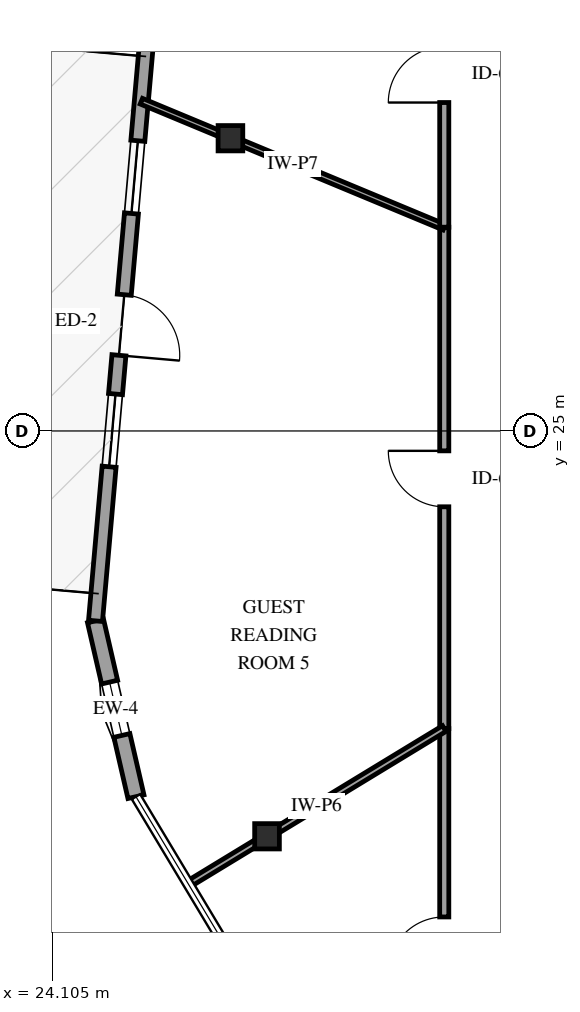
"""IFC4 building model, lengths in metres.
Left out: names, types, materials, properties, quantities, classifications, styles, units other than length and angle.
Written with IfcOpenShell. Run it as: python <this file> out.ifc"""

import sys

from ifc_helpers import new_model, si_unit, direction, frame, frame_2d, origin, origin_2d, place, context, subcontext, project, spatial, rectangle, i_section, extrude, element, fill, save


model = new_model("IFC4")
c1 = context("Model", 3, precision=1e-05, world=origin(), true_north=direction((0.0, 1.0)))
c2 = subcontext(c1, "Body", "Model", "MODEL_VIEW")
j1 = project(units=[si_unit("LENGTHUNIT", "METRE"), si_unit("PLANEANGLEUNIT", "RADIAN")], contexts=[c1])
p1 = place(None, origin())
s1 = spatial("IfcSite", under=j1, at=p1, CompositionType="ELEMENT")
p2 = place(p1, origin())
s2 = spatial("IfcBuilding", under=s1, at=p2, CompositionType="ELEMENT")
p3 = place(p2, frame((0.0, 0.0, 212.2)))
s3 = spatial("IfcBuildingStorey", under=s2, at=p3, CompositionType="ELEMENT", Elevation=212.2)
for number, where, z_axis, x_axis in (
    (1, (27.034, 29.814, 0.0), (0.0, 0.0, 1.0), (1.0, 0.0, 0.0)),
    (2, (27.635, 18.334, 0.0), (0.0, 0.0, 1.0), (1.0, 0.0, 0.0)),
):
    element("IfcColumn", number, at=place(p3, frame(where, z_axis=z_axis, x_axis=x_axis)), inside=s3, PredefinedType="COLUMN", context=c2, shape_type="SweptSolid", body=[
        extrude(i_section(OverallWidth=0.406, OverallDepth=0.416, WebThickness=0.03, FlangeThickness=0.048, FilletRadius=0.038, at=origin_2d()), origin(), (0.0, 0.0, 1.0), 3.6),
    ])
p4 = place(p3, frame((24.815, 21.877, 0.0), z_axis=(0.0, 0.0, 1.0), x_axis=(0.224270411894, -0.974526953116, 0.0)))
e3 = element("IfcWall", 3, at=p4, inside=s3, PredefinedType="SOLIDWALL", context=c2, shape_type="SweptSolid", body=[
    extrude(rectangle(XDim=2.967, YDim=0.27, at=frame_2d((1.483, 0.0))), origin(), (0.0, 0.0, 1.0), 2.679),
])
p5 = place(p4, frame((1.033, 0.0, 0.75)))
e4 = element("IfcOpeningElement", 4, at=p5, cuts=e3, PredefinedType="OPENING", context=c2, shape_type="SweptSolid", body=[
    extrude(rectangle(XDim=0.9, YDim=1.5, at=frame_2d((0.45, 0.75))), frame((0.0, 0.145, 0.0), z_axis=(0.0, -1.0, 0.0), x_axis=(1.0, 0.0, 0.0)), (0.0, 0.0, 1.0), 0.29),
])
p6 = place(p3, frame((25.673, 31.608, 0.0), z_axis=(0.0, 0.0, 1.0), x_axis=(-0.087869741306, -0.996131973467, 0.0)))
e5 = element("IfcWall", 5, at=p6, inside=s3, PredefinedType="SOLIDWALL", context=c2, shape_type="SweptSolid", body=[
    extrude(rectangle(XDim=9.769, YDim=0.23, at=frame_2d((4.885, 0.0))), origin(), (0.0, 0.0, 1.0), 2.679),
])
p7 = place(p6, frame((4.385, 0.0, 0.0)))
e6 = element("IfcOpeningElement", 6, at=p7, cuts=e5, PredefinedType="OPENING", context=c2, shape_type="SweptSolid", body=[
    extrude(rectangle(XDim=1.0, YDim=2.15, at=frame_2d((0.5, 1.075))), frame((0.0, 0.125, 0.0), z_axis=(0.0, -1.0, 0.0), x_axis=(1.0, 0.0, 0.0)), (0.0, 0.0, 1.0), 0.25),
])
p8 = place(p6, frame((1.843, 0.0, 0.72)))
e7 = element("IfcOpeningElement", 7, at=p8, cuts=e5, PredefinedType="OPENING", context=c2, shape_type="SweptSolid", body=[
    extrude(rectangle(XDim=1.2, YDim=1.6, at=frame_2d((0.6, 0.8))), frame((0.0, 0.125, 0.0), z_axis=(0.0, -1.0, 0.0), x_axis=(1.0, 0.0, 0.0)), (0.0, 0.0, 1.0), 0.25),
])
p9 = place(p6, frame((6.024, 0.0, 0.72)))
e8 = element("IfcOpeningElement", 8, at=p9, cuts=e5, PredefinedType="OPENING", context=c2, shape_type="SweptSolid", body=[
    extrude(rectangle(XDim=1.2, YDim=1.6, at=frame_2d((0.6, 0.8))), frame((0.0, 0.125, 0.0), z_axis=(0.0, -1.0, 0.0), x_axis=(1.0, 0.0, 0.0)), (0.0, 0.0, 1.0), 0.25),
])
p10 = place(p3, frame((30.55, 20.106, 0.0), z_axis=(0.0, 0.0, 1.0), x_axis=(0.0, 1.0, 0.0)))
e9 = element("IfcWall", 9, at=p10, inside=s3, PredefinedType="PARTITIONING", context=c2, shape_type="SweptSolid", body=[
    extrude(rectangle(XDim=8.245, YDim=0.15, at=frame_2d((4.123, 0.0))), origin(), (0.0, 0.0, 1.0), 3.3),
])
p11 = place(p10, frame((3.647, 0.0, 0.0)))
e10 = element("IfcOpeningElement", 10, at=p11, cuts=e9, PredefinedType="OPENING", context=c2, shape_type="SweptSolid", body=[
    extrude(rectangle(XDim=0.92, YDim=2.12, at=frame_2d((0.46, 1.06))), frame((0.0, 0.085, 0.0), z_axis=(0.0, -1.0, 0.0), x_axis=(1.0, 0.0, 0.0)), (0.0, 0.0, 1.0), 0.17),
])
p12 = place(p3, frame((30.55, 13.02, 0.0), z_axis=(0.0, 0.0, 1.0), x_axis=(0.0, 1.0, 0.0)))
e11 = element("IfcWall", 11, at=p12, inside=s3, PredefinedType="PARTITIONING", context=c2, shape_type="SweptSolid", body=[
    extrude(rectangle(XDim=7.086, YDim=0.15, at=frame_2d((3.543, 0.0))), origin(), (0.0, 0.0, 1.0), 3.3),
])
p13 = place(p12, frame((3.068, 0.0, 0.0)))
e12 = element("IfcOpeningElement", 12, at=p13, cuts=e11, PredefinedType="OPENING", context=c2, shape_type="SweptSolid", body=[
    extrude(rectangle(XDim=0.92, YDim=2.12, at=frame_2d((0.46, 1.06))), frame((0.0, 0.085, 0.0), z_axis=(0.0, -1.0, 0.0), x_axis=(1.0, 0.0, 0.0)), (0.0, 0.0, 1.0), 0.17),
])
p14 = place(p3, frame((30.55, 28.351, 0.0), z_axis=(0.0, 0.0, 1.0), x_axis=(-0.923299028804, 0.384081896748, 0.0)))
e13 = element("IfcWall", 13, at=p14, inside=s3, PredefinedType="PARTITIONING", context=c2, shape_type="SweptSolid", body=[
    extrude(rectangle(XDim=5.395, YDim=0.1, at=frame_2d((2.697, 0.0))), origin(), (0.0, 0.0, 1.0), 3.3),
])
p15 = place(p3, frame((30.55, 28.351, 0.0), z_axis=(0.0, 0.0, 1.0), x_axis=(0.0, 1.0, 0.0)))
e14 = element("IfcWall", 14, at=p15, inside=s3, PredefinedType="PARTITIONING", context=c2, shape_type="SweptSolid", body=[
    extrude(rectangle(XDim=5.05, YDim=0.15, at=frame_2d((2.525, 0.0))), origin(), (0.0, 0.0, 1.0), 3.3),
])
p16 = place(p15, frame((2.05, 0.0, 0.0)))
e15 = element("IfcOpeningElement", 15, at=p16, cuts=e14, PredefinedType="OPENING", context=c2, shape_type="SweptSolid", body=[
    extrude(rectangle(XDim=0.92, YDim=2.12, at=frame_2d((0.46, 1.06))), frame((0.0, 0.085, 0.0), z_axis=(0.0, -1.0, 0.0), x_axis=(1.0, 0.0, 0.0)), (0.0, 0.0, 1.0), 0.17),
])
p17 = place(p3, frame((30.55, 20.106, 0.0), z_axis=(0.0, 0.0, 1.0), x_axis=(-0.854463677574, -0.519511139156, 0.0)))
e16 = element("IfcWall", 16, at=p17, inside=s3, PredefinedType="PARTITIONING", context=c2, shape_type="SweptSolid", body=[
    extrude(rectangle(XDim=4.924, YDim=0.11, at=frame_2d((2.462, 0.0))), origin(), (0.0, 0.0, 1.0), 3.3),
])
p18 = place(p5, origin())
e17 = element("IfcWindow", 17, at=p18, inside=s3, PartitioningType="SINGLE_PANEL", PredefinedType="WINDOW", context=c2, shape_type="SweptSolid", body=[
    extrude(rectangle(XDim=0.9, YDim=1.5, at=frame_2d((0.45, 0.75))), frame((0.0, 0.03, 0.0), z_axis=(0.0, -1.0, 0.0), x_axis=(1.0, 0.0, 0.0)), (0.0, 0.0, 1.0), 0.06),
])
fill(e4, e17)
p19 = place(p7, origin())
e18 = element("IfcDoor", 18, at=p19, inside=s3, OperationType="SINGLE_SWING_RIGHT", PredefinedType="DOOR", context=c2, shape_type="SweptSolid", body=[
    extrude(rectangle(XDim=1.0, YDim=2.15, at=frame_2d((0.5, 1.075))), frame((0.0, 0.025, 0.0), z_axis=(0.0, -1.0, 0.0), x_axis=(1.0, 0.0, 0.0)), (0.0, 0.0, 1.0), 0.05),
])
fill(e6, e18)
p20 = place(p8, origin())
e19 = element("IfcWindow", 19, at=p20, inside=s3, PartitioningType="SINGLE_PANEL", PredefinedType="WINDOW", context=c2, shape_type="SweptSolid", body=[
    extrude(rectangle(XDim=1.2, YDim=1.6, at=frame_2d((0.6, 0.8))), frame((0.0, 0.03, 0.0), z_axis=(0.0, -1.0, 0.0), x_axis=(1.0, 0.0, 0.0)), (0.0, 0.0, 1.0), 0.06),
])
fill(e7, e19)
p21 = place(p9, origin())
e20 = element("IfcWindow", 20, at=p21, inside=s3, PartitioningType="SINGLE_PANEL", PredefinedType="WINDOW", context=c2, shape_type="SweptSolid", body=[
    extrude(rectangle(XDim=1.2, YDim=1.6, at=frame_2d((0.6, 0.8))), frame((0.0, 0.03, 0.0), z_axis=(0.0, -1.0, 0.0), x_axis=(1.0, 0.0, 0.0)), (0.0, 0.0, 1.0), 0.06),
])
fill(e8, e20)
p22 = place(p11, origin())
e21 = element("IfcDoor", 21, at=p22, inside=s3, OperationType="SINGLE_SWING_RIGHT", PredefinedType="DOOR", context=c2, shape_type="SweptSolid", body=[
    extrude(rectangle(XDim=0.92, YDim=2.12, at=frame_2d((0.46, 1.06))), frame((0.0, 0.025, 0.0), z_axis=(0.0, -1.0, 0.0), x_axis=(1.0, 0.0, 0.0)), (0.0, 0.0, 1.0), 0.05),
])
fill(e10, e21)
p23 = place(p13, origin())
e22 = element("IfcDoor", 22, at=p23, inside=s3, OperationType="SINGLE_SWING_LEFT", PredefinedType="DOOR", context=c2, shape_type="SweptSolid", body=[
    extrude(rectangle(XDim=0.92, YDim=2.12, at=frame_2d((0.46, 1.06))), frame((0.0, 0.025, 0.0), z_axis=(0.0, -1.0, 0.0), x_axis=(1.0, 0.0, 0.0)), (0.0, 0.0, 1.0), 0.05),
])
fill(e12, e22)
p24 = place(p16, origin())
e23 = element("IfcDoor", 23, at=p24, inside=s3, OperationType="SINGLE_SWING_LEFT", PredefinedType="DOOR", context=c2, shape_type="SweptSolid", body=[
    extrude(rectangle(XDim=0.92, YDim=2.12, at=frame_2d((0.46, 1.06))), frame((0.0, 0.025, 0.0), z_axis=(0.0, -1.0, 0.0), x_axis=(1.0, 0.0, 0.0)), (0.0, 0.0, 1.0), 0.05),
])
fill(e15, e23)
save(model, sys.argv[1])
